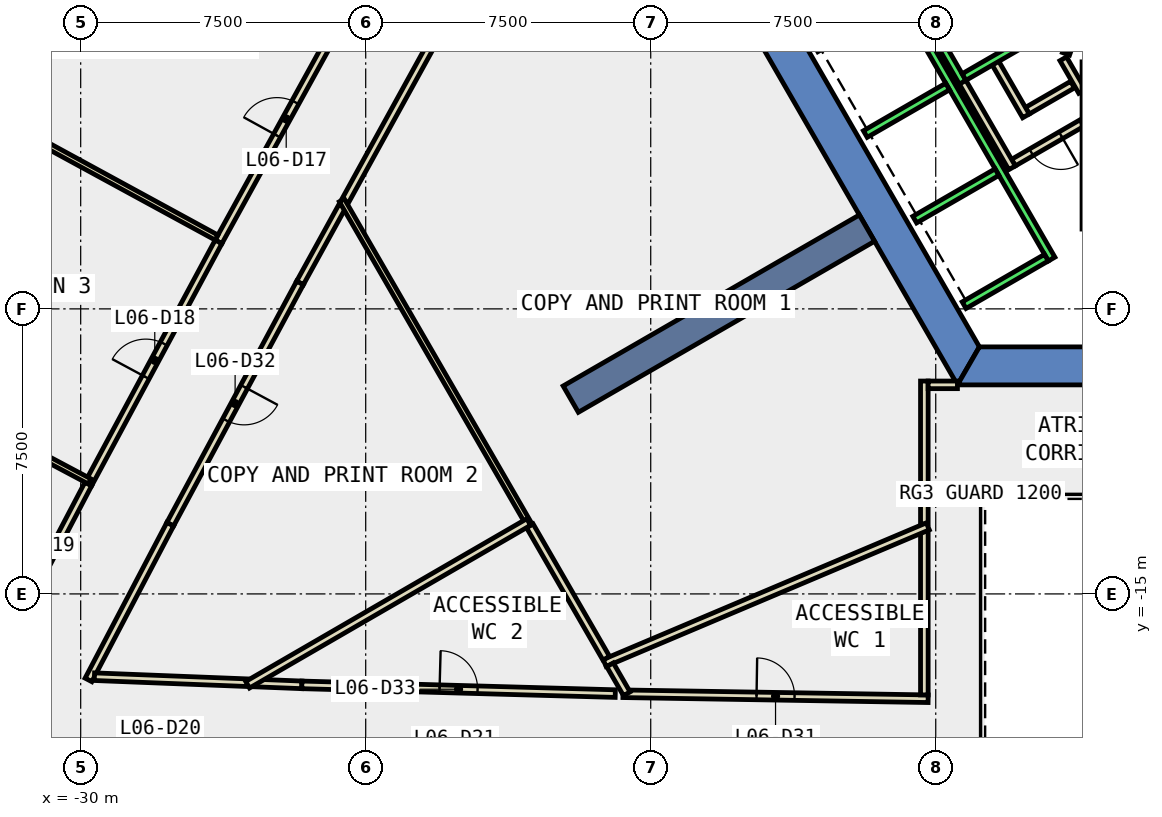
"""IFC4 building model, lengths in metres.
Left out: names, types, materials, properties, quantities, classifications, styles, units other than length and angle.
Written with IfcOpenShell. Run it as: python <this file> out.ifc"""

import sys

from ifc_helpers import new_model, si_unit, direction, frame, frame_2d, origin, place, context, subcontext, project, spatial, polyline, rectangle, outline, extrude, element, fill, save


model = new_model("IFC4")
c1 = context("Model", 3, precision=1e-05, world=origin(), true_north=direction((0.0, 1.0)))
c2 = subcontext(c1, "Body", "Model", "MODEL_VIEW")
j1 = project(units=[si_unit("LENGTHUNIT", "METRE"), si_unit("PLANEANGLEUNIT", "RADIAN")], contexts=[c1])
p1 = place(None, origin())
s1 = spatial("IfcSite", under=j1, at=p1, CompositionType="ELEMENT")
p2 = place(p1, origin())
s2 = spatial("IfcBuilding", under=s1, at=p2, CompositionType="ELEMENT")
p3 = place(p2, frame((0.0, 0.0, 35.0)))
s3 = spatial("IfcBuildingStorey", under=s2, at=p3, CompositionType="ELEMENT", Elevation=35.0)
p4 = place(p3, frame((0.0, 0.0, -0.6)))
e1 = element("IfcWall", 1, at=p4, inside=s3, PredefinedType="SHEAR", context=c2, shape_type="SweptSolid", body=[
    extrude(outline(polyline([(-13.856, 2.5), (-6.928, -9.5), (-6.351, -8.5), (-12.702, 2.5), (-13.856, 2.5)])), origin(), (0.0, 0.0, 1.0), 4.4),
])
p5 = place(p3, frame((0.0, 0.0, -0.6)))
e2 = element("IfcWall", 2, at=p5, inside=s3, PredefinedType="SHEAR", context=c2, shape_type="SweptSolid", body=[
    extrude(outline(polyline([(3.75, -9.5), (3.75, -8.5), (-6.351, -8.5), (-6.928, -9.5), (3.75, -9.5)])), origin(), (0.0, 0.0, 1.0), 4.4),
])
p6 = place(p3, frame((-9.31, -5.375, -0.6), z_axis=(0.0, 0.0, 1.0), x_axis=(-0.866017533419, -0.500013631625, 0.0)))
e3 = element("IfcWall", 3, at=p6, inside=s3, PredefinedType="SHEAR", context=c2, shape_type="SweptSolid", body=[
    extrude(rectangle(XDim=9.0, YDim=0.8, at=frame_2d((4.5, 0.0))), origin(), (0.0, 0.0, 1.0), 4.4),
])
p7 = place(p3, frame((-30.255, 4.107, 0.0), z_axis=(0.0, 0.0, 1.0), x_axis=(-0.482596003603, -0.875843078015, 0.0)))
e4 = element("IfcWall", 4, at=p7, inside=s3, PredefinedType="STANDARD", context=c2, shape_type="SweptSolid", body=[
    extrude(rectangle(XDim=6.115, YDim=0.3, at=frame_2d((3.058, 0.0))), origin(), (0.0, 0.0, 1.0), 3.8),
])
p8 = place(p7, frame((0.529, 0.0, 0.9)))
e5 = element("IfcOpeningElement", 5, at=p8, cuts=e4, PredefinedType="OPENING", context=c2, shape_type="SweptSolid", body=[
    extrude(rectangle(XDim=2.0, YDim=2.6, at=frame_2d((1.0, 1.3))), frame((0.0, 0.16, 0.0), z_axis=(0.0, -1.0, 0.0), x_axis=(1.0, 0.0, 0.0)), (0.0, 0.0, 1.0), 0.32),
])
p9 = place(p7, frame((3.586, 0.0, 0.9)))
e6 = element("IfcOpeningElement", 6, at=p9, cuts=e4, PredefinedType="OPENING", context=c2, shape_type="SweptSolid", body=[
    extrude(rectangle(XDim=2.0, YDim=2.6, at=frame_2d((1.0, 1.3))), frame((0.0, 0.16, 0.0), z_axis=(0.0, -1.0, 0.0), x_axis=(1.0, 0.0, 0.0)), (0.0, 0.0, 1.0), 0.32),
])
p10 = place(p3, frame((-20.751, -0.505, 0.0), z_axis=(0.0, 0.0, 1.0), x_axis=(-0.482566110981, -0.875859548405, 0.0)))
e7 = element("IfcWall", 7, at=p10, inside=s3, PredefinedType="PARTITIONING", context=c2, shape_type="SweptSolid", body=[
    extrude(rectangle(XDim=4.748, YDim=0.2, at=frame_2d((2.374, 0.0))), origin(), (0.0, 0.0, 1.0), 3.8),
])
p11 = place(p3, frame((-15.73, -17.627, 0.0), z_axis=(0.0, 0.0, 1.0), x_axis=(0.999866746812, -0.016324479129, 0.0)))
e8 = element("IfcWall", 8, at=p11, inside=s3, PredefinedType="PARTITIONING", context=c2, shape_type="SweptSolid", body=[
    extrude(rectangle(XDim=8.031, YDim=0.2, at=frame_2d((4.016, 0.0))), origin(), (0.0, 0.0, 1.0), 3.8),
])
p12 = place(p11, frame((3.515, 0.0, 0.0)))
e9 = element("IfcOpeningElement", 9, at=p12, cuts=e8, PredefinedType="OPENING", context=c2, shape_type="SweptSolid", body=[
    extrude(rectangle(XDim=1.0, YDim=2.1, at=frame_2d((0.5, 1.05))), frame((0.0, 0.11, 0.0), z_axis=(0.0, -1.0, 0.0), x_axis=(1.0, 0.0, 0.0)), (0.0, 0.0, 1.0), 0.22),
])
p13 = place(p3, frame((-23.114, -4.794, 0.0), z_axis=(0.0, 0.0, 1.0), x_axis=(-0.482482362329, -0.875905685586, 0.0)))
e10 = element("IfcWall", 10, at=p13, inside=s3, PredefinedType="PARTITIONING", context=c2, shape_type="SweptSolid", body=[
    extrude(rectangle(XDim=2.311, YDim=0.2, at=frame_2d((1.156, 0.0))), origin(), (0.0, 0.0, 1.0), 3.8),
])
p14 = place(p3, frame((-24.229, -6.818, 0.0), z_axis=(0.0, 0.0, 1.0), x_axis=(-0.473714049803, -0.88067871498, 0.0)))
e11 = element("IfcWall", 11, at=p14, inside=s3, PredefinedType="PARTITIONING", context=c2, shape_type="SweptSolid", body=[
    extrude(rectangle(XDim=7.209, YDim=0.2, at=frame_2d((3.604, 0.0))), origin(), (0.0, 0.0, 1.0), 3.8),
])
p15 = place(p14, frame((3.104, 0.0, 0.0)))
e12 = element("IfcOpeningElement", 12, at=p15, cuts=e11, PredefinedType="OPENING", context=c2, shape_type="SweptSolid", body=[
    extrude(rectangle(XDim=1.0, YDim=2.1, at=frame_2d((0.5, 1.05))), frame((0.0, 0.11, 0.0), z_axis=(0.0, -1.0, 0.0), x_axis=(1.0, 0.0, 0.0)), (0.0, 0.0, 1.0), 0.22),
])
p16 = place(p3, frame((-27.644, -13.167, 0.0), z_axis=(0.0, 0.0, 1.0), x_axis=(-0.464919738277, -0.885352831904, 0.0)))
e13 = element("IfcWall", 13, at=p16, inside=s3, PredefinedType="PARTITIONING", context=c2, shape_type="SweptSolid", body=[
    extrude(rectangle(XDim=4.626, YDim=0.2, at=frame_2d((2.313, 0.0))), origin(), (0.0, 0.0, 1.0), 3.8),
])
p17 = place(p3, frame((-29.639, -17.178, 0.0), z_axis=(0.0, 0.0, 1.0), x_axis=(0.999228076722, -0.039284229546, 0.0)))
e14 = element("IfcWall", 14, at=p17, inside=s3, PredefinedType="PARTITIONING", context=c2, shape_type="SweptSolid", body=[
    extrude(rectangle(XDim=4.021, YDim=0.2, at=frame_2d((2.01, 0.0))), origin(), (0.0, 0.0, 1.0), 3.8),
])
p18 = place(p3, frame((-25.421, -17.344, 0.0), z_axis=(0.0, 0.0, 1.0), x_axis=(0.999219068508, -0.039512695804, 0.0)))
e15 = element("IfcWall", 15, at=p18, inside=s3, PredefinedType="PARTITIONING", context=c2, shape_type="SweptSolid", body=[
    extrude(rectangle(XDim=1.242, YDim=0.2, at=frame_2d((0.621, 0.0))), origin(), (0.0, 0.0, 1.0), 3.8),
])
p19 = place(p3, frame((-24.18, -17.393, 0.0), z_axis=(0.0, 0.0, 1.0), x_axis=(0.999611380121, -0.02787631132, 0.0)))
e16 = element("IfcWall", 16, at=p19, inside=s3, PredefinedType="PARTITIONING", context=c2, shape_type="SweptSolid", body=[
    extrude(rectangle(XDim=8.25, YDim=0.2, at=frame_2d((4.125, 0.0))), origin(), (0.0, 0.0, 1.0), 3.8),
])
p20 = place(p19, frame((3.625, 0.0, 0.0)))
e17 = element("IfcOpeningElement", 17, at=p20, cuts=e16, PredefinedType="OPENING", context=c2, shape_type="SweptSolid", body=[
    extrude(rectangle(XDim=1.0, YDim=2.1, at=frame_2d((0.5, 1.05))), frame((0.0, 0.11, 0.0), z_axis=(0.0, -1.0, 0.0), x_axis=(1.0, 0.0, 0.0)), (0.0, 0.0, 1.0), 0.22),
])
p21 = place(p3, frame((-26.373, -5.736, 0.0), z_axis=(0.0, 0.0, 1.0), x_axis=(0.482587313112, 0.875847866483, 0.0)))
e18 = element("IfcWall", 18, at=p21, inside=s3, PredefinedType="PARTITIONING", context=c2, shape_type="SweptSolid", body=[
    extrude(rectangle(XDim=7.232, YDim=0.2, at=frame_2d((3.616, 0.0))), origin(), (0.0, 0.0, 1.0), 3.8),
])
p22 = place(p21, frame((3.191, 0.0, 0.0)))
e19 = element("IfcOpeningElement", 19, at=p22, cuts=e18, PredefinedType="OPENING", context=c2, shape_type="SweptSolid", body=[
    extrude(rectangle(XDim=1.0, YDim=2.1, at=frame_2d((0.5, 1.05))), frame((0.0, 0.11, 0.0), z_axis=(0.0, -1.0, 0.0), x_axis=(1.0, 0.0, 0.0)), (0.0, 0.0, 1.0), 0.22),
])
p23 = place(p3, frame((-29.799, -12.106, 0.0), z_axis=(0.0, 0.0, 1.0), x_axis=(0.473681086062, 0.880696445268, 0.0)))
e20 = element("IfcWall", 20, at=p23, inside=s3, PredefinedType="PARTITIONING", context=c2, shape_type="SweptSolid", body=[
    extrude(rectangle(XDim=7.233, YDim=0.2, at=frame_2d((3.616, 0.0))), origin(), (0.0, 0.0, 1.0), 3.8),
])
p24 = place(p23, frame((3.191, 0.0, 0.0)))
e21 = element("IfcOpeningElement", 21, at=p24, cuts=e20, PredefinedType="OPENING", context=c2, shape_type="SweptSolid", body=[
    extrude(rectangle(XDim=1.0, YDim=2.1, at=frame_2d((0.5, 1.05))), frame((0.0, 0.11, 0.0), z_axis=(0.0, -1.0, 0.0), x_axis=(1.0, 0.0, 0.0)), (0.0, 0.0, 1.0), 0.22),
])
p25 = place(p3, frame((-32.696, -17.626, 0.0), z_axis=(0.0, 0.0, 1.0), x_axis=(0.464767882002, 0.885432558617, 0.0)))
e22 = element("IfcWall", 22, at=p25, inside=s3, PredefinedType="PARTITIONING", context=c2, shape_type="SweptSolid", body=[
    extrude(rectangle(XDim=6.233, YDim=0.2, at=frame_2d((3.117, 0.0))), origin(), (0.0, 0.0, 1.0), 3.8),
])
p26 = place(p25, frame((2.654, 0.0, 0.0)))
e23 = element("IfcOpeningElement", 23, at=p26, cuts=e22, PredefinedType="OPENING", context=c2, shape_type="SweptSolid", body=[
    extrude(rectangle(XDim=1.0, YDim=2.1, at=frame_2d((0.5, 1.05))), frame((0.0, 0.11, 0.0), z_axis=(0.0, -1.0, 0.0), x_axis=(1.0, 0.0, 0.0)), (0.0, 0.0, 1.0), 0.22),
])
p27 = place(p3, frame((-3.9, -1.599, 0.0), z_axis=(0.0, 0.0, 1.0), x_axis=(-0.865969445389, -0.500096910261, 0.0)))
e24 = element("IfcWall", 24, at=p27, inside=s3, PredefinedType="PARTITIONING", context=c2, shape_type="SweptSolid", body=[
    extrude(rectangle(XDim=1.373, YDim=0.2, at=frame_2d((0.687, 0.0))), origin(), (0.0, 0.0, 1.0), 3.8),
])
p28 = place(p3, frame((-5.126, -2.422, 0.0), z_axis=(0.0, 0.0, 1.0), x_axis=(-0.500062241894, 0.865989465428, 0.0)))
e25 = element("IfcWall", 25, at=p28, inside=s3, PredefinedType="PARTITIONING", context=c2, shape_type="SweptSolid", body=[
    extrude(rectangle(XDim=1.7, YDim=0.2, at=frame_2d((0.85, 0.0))), origin(), (0.0, 0.0, 1.0), 3.8),
])
p29 = place(p3, frame((-3.65, -2.61, 0.0), z_axis=(0.0, 0.0, 1.0), x_axis=(-0.866072462134, -0.499918483688, 0.0)))
e26 = element("IfcWall", 26, at=p29, inside=s3, PredefinedType="PARTITIONING", context=c2, shape_type="SweptSolid", body=[
    extrude(rectangle(XDim=2.084, YDim=0.2, at=frame_2d((1.042, 0.0))), origin(), (0.0, 0.0, 1.0), 3.8),
])
p30 = place(p29, frame((0.642, 0.0, 0.0)))
e27 = element("IfcOpeningElement", 27, at=p30, cuts=e26, PredefinedType="OPENING", context=c2, shape_type="SweptSolid", body=[
    extrude(rectangle(XDim=0.9, YDim=2.1, at=frame_2d((0.45, 1.05))), frame((0.0, 0.11, 0.0), z_axis=(0.0, -1.0, 0.0), x_axis=(1.0, 0.0, 0.0)), (0.0, 0.0, 1.0), 0.22),
])
p31 = place(p3, frame((-5.492, -3.788, 0.0), z_axis=(0.0, 0.0, 1.0), x_axis=(-0.500008949224, 0.866020236886, 0.0)))
e28 = element("IfcWall", 28, at=p31, inside=s3, PredefinedType="PARTITIONING", context=c2, shape_type="SweptSolid", body=[
    extrude(rectangle(XDim=2.68, YDim=0.2, at=frame_2d((1.34, 0.0))), origin(), (0.0, 0.0, 1.0), 3.8),
])
p32 = place(p3, frame((-4.145, -0.92, 0.0), z_axis=(0.0, 0.0, 1.0), x_axis=(0.499743786207, -0.866173278362, 0.0)))
e29 = element("IfcWall", 29, at=p32, inside=s3, PredefinedType="PARTITIONING", context=c2, shape_type="SweptSolid", body=[
    extrude(rectangle(XDim=0.991, YDim=0.2, at=frame_2d((0.495, 0.0))), origin(), (0.0, 0.0, 1.0), 3.8),
])
p33 = place(p3, frame((-3.96, -0.47, 0.0), z_axis=(0.0, 0.0, 1.0), x_axis=(-0.334824194261, -0.942280615813, 0.0)))
e30 = element("IfcWall", 30, at=p33, inside=s3, PredefinedType="PARTITIONING", context=c2, shape_type="SweptSolid", body=[
    extrude(rectangle(XDim=0.338, YDim=0.2, at=frame_2d((0.169, 0.0))), origin(), (0.0, 0.0, 1.0), 3.8),
])
p34 = place(p3, frame((-7.8, -13.161, 0.0), z_axis=(0.0, 0.0, 1.0), x_axis=(0.0, 1.0, 0.0)))
e31 = element("IfcWall", 31, at=p34, inside=s3, PredefinedType="PARTITIONING", context=c2, shape_type="SweptSolid", body=[
    extrude(rectangle(XDim=3.762, YDim=0.2, at=frame_2d((1.881, 0.0))), origin(), (0.0, 0.0, 1.0), 3.8),
])
p35 = place(p3, frame((-7.7, -9.499, 0.0), z_axis=(0.0, 0.0, 1.0), x_axis=(1.0, 0.0, 0.0)))
e32 = element("IfcWall", 32, at=p35, inside=s3, PredefinedType="PARTITIONING", context=c2, shape_type="SweptSolid", body=[
    extrude(rectangle(XDim=0.771, YDim=0.2, at=frame_2d((0.385, 0.0))), origin(), (0.0, 0.0, 1.0), 3.8),
])
p36 = place(p3, frame((-7.8, -17.657, 0.0), z_axis=(0.0, 0.0, 1.0), x_axis=(0.0, 1.0, 0.0)))
e33 = element("IfcWall", 33, at=p36, inside=s3, PredefinedType="PARTITIONING", context=c2, shape_type="SweptSolid", body=[
    extrude(rectangle(XDim=4.296, YDim=0.2, at=frame_2d((2.148, 0.0))), origin(), (0.0, 0.0, 1.0), 3.8),
])
p37 = place(p3, frame((-7.708, -13.222, 0.0), z_axis=(0.0, 0.0, 1.0), x_axis=(-0.921093468555, -0.389341523839, 0.0)))
e34 = element("IfcWall", 34, at=p37, inside=s3, PredefinedType="PARTITIONING", context=c2, shape_type="SweptSolid", body=[
    extrude(rectangle(XDim=9.233, YDim=0.2, at=frame_2d((4.617, 0.0))), origin(), (0.0, 0.0, 1.0), 3.8),
])
p38 = place(p3, frame((-18.182, -13.207, 0.0), z_axis=(0.0, 0.0, 1.0), x_axis=(-0.500081416649, 0.865978392757, 0.0)))
e35 = element("IfcWall", 35, at=p38, inside=s3, PredefinedType="PARTITIONING", context=c2, shape_type="SweptSolid", body=[
    extrude(rectangle(XDim=9.89, YDim=0.15, at=frame_2d((4.945, 0.0))), origin(), (0.0, 0.0, 1.0), 3.8),
])
p39 = place(p3, frame((-16.171, -16.692, 0.0), z_axis=(0.0, 0.0, 1.0), x_axis=(-0.499813503007, 0.866133051102, 0.0)))
e36 = element("IfcWall", 36, at=p39, inside=s3, PredefinedType="PARTITIONING", context=c2, shape_type="SweptSolid", body=[
    extrude(rectangle(XDim=4.023, YDim=0.2, at=frame_2d((2.012, 0.0))), origin(), (0.0, 0.0, 1.0), 3.8),
])
p40 = place(p3, frame((-15.63, -17.628, 0.0), z_axis=(0.0, 0.0, 1.0), x_axis=(-0.500577563191, 0.865691690632, 0.0)))
e37 = element("IfcWall", 37, at=p40, inside=s3, PredefinedType="PARTITIONING", context=c2, shape_type="SweptSolid", body=[
    extrude(rectangle(XDim=0.881, YDim=0.2, at=frame_2d((0.441, 0.0))), origin(), (0.0, 0.0, 1.0), 3.8),
])
p41 = place(p3, frame((-18.211, -13.108, 0.0), z_axis=(0.0, 0.0, 1.0), x_axis=(-0.865421721769, -0.501044153235, 0.0)))
e38 = element("IfcWall", 38, at=p41, inside=s3, PredefinedType="PARTITIONING", context=c2, shape_type="SweptSolid", body=[
    extrude(rectangle(XDim=8.546, YDim=0.2, at=frame_2d((4.273, 0.0))), origin(), (0.0, 0.0, 1.0), 3.8),
])
p42 = place(p3, frame((-26.425, -5.623, 0.0), z_axis=(0.0, 0.0, 1.0), x_axis=(-0.87825523631, 0.478192157919, 0.0)))
e39 = element("IfcWall", 39, at=p42, inside=s3, PredefinedType="PARTITIONING", context=c2, shape_type="SweptSolid", body=[
    extrude(rectangle(XDim=6.481, YDim=0.15, at=frame_2d((3.24, 0.0))), origin(), (0.0, 0.0, 1.0), 3.8),
])
p43 = place(p3, frame((-29.764, -12.04, 0.0), z_axis=(0.0, 0.0, 1.0), x_axis=(-0.883018657393, 0.469337885426, 0.0)))
e40 = element("IfcWall", 40, at=p43, inside=s3, PredefinedType="PARTITIONING", context=c2, shape_type="SweptSolid", body=[
    extrude(rectangle(XDim=6.58, YDim=0.15, at=frame_2d((3.29, 0.0))), origin(), (0.0, 0.0, 1.0), 3.8),
])
p44 = place(p3, frame((-8.192, 0.888, 0.0), z_axis=(0.0, 0.0, 1.0), x_axis=(0.49994636267, -0.866056369097, 0.0)))
e41 = element("IfcWall", 41, at=p44, inside=s3, PredefinedType="STANDARD", context=c2, shape_type="SweptSolid", body=[
    extrude(rectangle(XDim=2.8, YDim=0.2, at=frame_2d((1.4, 0.0))), origin(), (0.0, 0.0, 1.0), 3.8),
])
p45 = place(p3, frame((-4.677, -0.2, 0.0), z_axis=(0.0, 0.0, 1.0), x_axis=(-0.865973769406, -0.500089422704, 0.0)))
e42 = element("IfcWall", 42, at=p45, inside=s3, PredefinedType="STANDARD", context=c2, shape_type="SweptSolid", body=[
    extrude(rectangle(XDim=2.399, YDim=0.2, at=frame_2d((1.2, 0.0))), origin(), (0.0, 0.0, 1.0), 3.8),
])
p46 = place(p3, frame((-9.751, 2.99, 0.0), z_axis=(0.0, 0.0, 1.0), x_axis=(0.50000090737, -0.866024879913, 0.0)))
e43 = element("IfcWall", 43, at=p46, inside=s3, PredefinedType="STANDARD", context=c2, shape_type="SweptSolid", body=[
    extrude(rectangle(XDim=10.6, YDim=0.2, at=frame_2d((5.3, 0.0))), origin(), (0.0, 0.0, 1.0), 3.8),
])
for number, where, z_axis, x_axis in (
    (44, (-7.188, -1.65, 0.0), (0.0, 0.0, 1.0), (-0.866, -0.5, 0.0)),
    (45, (-5.888, -3.902, 0.0), (0.0, 0.0, 1.0), (-0.866, -0.5, 0.0)),
    (46, (-4.588, -6.153, 0.0), (0.0, 0.0, 1.0), (-0.866, -0.5, 0.0)),
):
    element("IfcWall", number, at=place(p3, frame(where, z_axis=z_axis, x_axis=x_axis)), inside=s3, PredefinedType="STANDARD", context=c2, shape_type="SweptSolid", body=[
        extrude(rectangle(XDim=2.5, YDim=0.2, at=frame_2d((1.25, 0.0))), origin(), (0.0, 0.0, 1.0), 3.8),
    ])
p47 = place(p3, frame((-3.55, -1.0, 0.0), z_axis=(0.0, 0.0, 1.0), x_axis=(0.0, -1.0, 0.0)))
e47 = element("IfcWall", 47, at=p47, inside=s3, PredefinedType="STANDARD", context=c2, shape_type="SweptSolid", body=[
    extrude(rectangle(XDim=4.4, YDim=0.2, at=frame_2d((2.2, 0.0))), origin(), (0.0, 0.0, 1.0), 3.8),
])
p48 = place(p47, frame((1.65, 0.0, 0.0)))
e48 = element("IfcOpeningElement", 48, at=p48, cuts=e47, PredefinedType="OPENING", context=c2, shape_type="SweptSolid", body=[
    extrude(rectangle(XDim=1.1, YDim=2.2, at=frame_2d((0.55, 1.1))), frame((0.0, 0.11, 0.0), z_axis=(0.0, -1.0, 0.0), x_axis=(1.0, 0.0, 0.0)), (0.0, 0.0, 1.0), 0.22),
])
p49 = place(p22, origin())
e49 = element("IfcDoor", 49, at=p49, inside=s3, OperationType="SINGLE_SWING_LEFT", PredefinedType="DOOR", context=c2, shape_type="SweptSolid", body=[
    extrude(rectangle(XDim=1.0, YDim=2.1, at=frame_2d((0.5, 1.05))), frame((0.0, 0.025, 0.0), z_axis=(0.0, -1.0, 0.0), x_axis=(1.0, 0.0, 0.0)), (0.0, 0.0, 1.0), 0.05),
])
fill(e19, e49)
p50 = place(p24, origin())
e50 = element("IfcDoor", 50, at=p50, inside=s3, OperationType="SINGLE_SWING_RIGHT", PredefinedType="DOOR", context=c2, shape_type="SweptSolid", body=[
    extrude(rectangle(XDim=1.0, YDim=2.1, at=frame_2d((0.5, 1.05))), frame((0.0, 0.025, 0.0), z_axis=(0.0, -1.0, 0.0), x_axis=(1.0, 0.0, 0.0)), (0.0, 0.0, 1.0), 0.05),
])
fill(e21, e50)
p51 = place(p12, origin())
e51 = element("IfcDoor", 51, at=p51, inside=s3, OperationType="SINGLE_SWING_LEFT", PredefinedType="DOOR", context=c2, shape_type="SweptSolid", body=[
    extrude(rectangle(XDim=1.0, YDim=2.1, at=frame_2d((0.5, 1.05))), frame((0.0, 0.025, 0.0), z_axis=(0.0, -1.0, 0.0), x_axis=(1.0, 0.0, 0.0)), (0.0, 0.0, 1.0), 0.05),
])
fill(e9, e51)
p52 = place(p15, origin())
e52 = element("IfcDoor", 52, at=p52, inside=s3, OperationType="SINGLE_SWING_RIGHT", PredefinedType="DOOR", context=c2, shape_type="SweptSolid", body=[
    extrude(rectangle(XDim=1.0, YDim=2.1, at=frame_2d((0.5, 1.05))), frame((0.0, 0.025, 0.0), z_axis=(0.0, -1.0, 0.0), x_axis=(1.0, 0.0, 0.0)), (0.0, 0.0, 1.0), 0.05),
])
fill(e12, e52)
p53 = place(p20, origin())
e53 = element("IfcDoor", 53, at=p53, inside=s3, OperationType="SINGLE_SWING_RIGHT", PredefinedType="DOOR", context=c2, shape_type="SweptSolid", body=[
    extrude(rectangle(XDim=1.0, YDim=2.1, at=frame_2d((0.5, 1.05))), frame((0.0, 0.025, 0.0), z_axis=(0.0, -1.0, 0.0), x_axis=(1.0, 0.0, 0.0)), (0.0, 0.0, 1.0), 0.05),
])
fill(e17, e53)
p54 = place(p30, origin())
e54 = element("IfcDoor", 54, at=p54, inside=s3, OperationType="SINGLE_SWING_LEFT", PredefinedType="DOOR", context=c2, shape_type="SweptSolid", body=[
    extrude(rectangle(XDim=0.9, YDim=2.1, at=frame_2d((0.45, 1.05))), frame((0.0, 0.025, 0.0), z_axis=(0.0, -1.0, 0.0), x_axis=(1.0, 0.0, 0.0)), (0.0, 0.0, 1.0), 0.05),
])
fill(e27, e54)
save(model, sys.argv[1])
